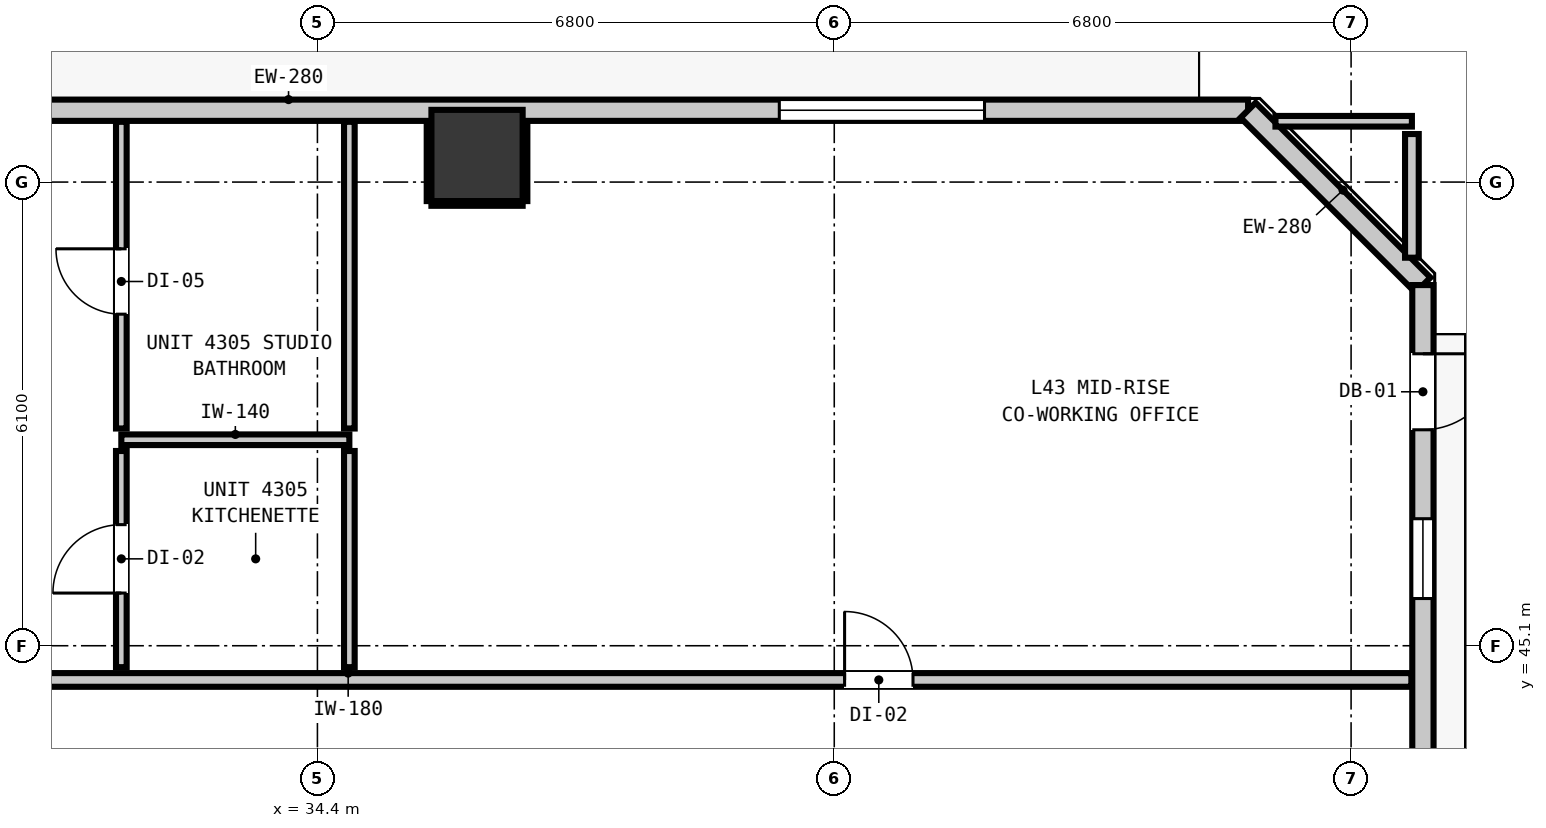
"""IFC4 building model, lengths in metres.
Left out: names, types, materials, properties, quantities, classifications, styles, units other than length and angle.
Written with IfcOpenShell. Run it as: python <this file> out.ifc"""

import sys

from ifc_helpers import new_model, si_unit, direction, frame, frame_2d, origin, origin_2d, place, context, subcontext, project, spatial, rectangle, extrude, element, fill, save


model = new_model("IFC4")
c1 = context("Model", 3, precision=1e-05, world=origin(), true_north=direction((0.0, 1.0)))
c2 = subcontext(c1, "Body", "Model", "MODEL_VIEW")
j1 = project(units=[si_unit("LENGTHUNIT", "METRE"), si_unit("PLANEANGLEUNIT", "RADIAN")], contexts=[c1])
p1 = place(None, origin())
s1 = spatial("IfcSite", under=j1, at=p1, CompositionType="ELEMENT")
p2 = place(p1, origin())
s2 = spatial("IfcBuilding", under=s1, at=p2, CompositionType="ELEMENT")
p3 = place(p2, frame((0.0, 0.0, 149.24)))
s3 = spatial("IfcBuildingStorey", under=s2, at=p3, CompositionType="ELEMENT", Elevation=149.24)
p4 = place(p3, frame((36.5, 51.55, 0.0), z_axis=(0.0, 0.0, 1.0), x_axis=(1.0, 0.0, 0.0)))
e1 = element("IfcColumn", 1, at=p4, inside=s3, PredefinedType="COLUMN", context=c2, shape_type="SweptSolid", body=[
    extrude(rectangle(XDim=1.2, YDim=1.2, at=origin_2d()), origin(), (0.0, 0.0, 1.0), 3.32),
])
p5 = place(p3, frame((11.555, 52.145, 0.0), z_axis=(0.0, 0.0, 1.0), x_axis=(1.0, 0.0, 0.0)))
e2 = element("IfcWall", 2, at=p5, inside=s3, PredefinedType="STANDARD", context=c2, shape_type="SweptSolid", body=[
    extrude(rectangle(XDim=35.09, YDim=0.28, at=frame_2d((17.545, 0.0))), origin(), (0.0, 0.0, 1.0), 3.08),
])
p6 = place(p5, frame((4.062, 0.0, 0.0)))
e3 = element("IfcOpeningElement", 3, at=p6, cuts=e2, PredefinedType="OPENING", context=c2, shape_type="SweptSolid", body=[
    extrude(rectangle(XDim=1.0, YDim=2.15, at=frame_2d((0.5, 1.075))), frame((0.0, 0.15, 0.0), z_axis=(0.0, -1.0, 0.0), x_axis=(1.0, 0.0, 0.0)), (0.0, 0.0, 1.0), 0.3),
])
p7 = place(p5, frame((5.888, 0.0, 0.85)))
e4 = element("IfcOpeningElement", 4, at=p7, cuts=e2, PredefinedType="OPENING", context=c2, shape_type="SweptSolid", body=[
    extrude(rectangle(XDim=1.05, YDim=1.65, at=frame_2d((0.525, 0.825))), frame((0.0, 0.15, 0.0), z_axis=(0.0, -1.0, 0.0), x_axis=(1.0, 0.0, 0.0)), (0.0, 0.0, 1.0), 0.3),
])
p8 = place(p5, frame((0.378, 0.0, 0.85)))
e5 = element("IfcOpeningElement", 5, at=p8, cuts=e2, PredefinedType="OPENING", context=c2, shape_type="SweptSolid", body=[
    extrude(rectangle(XDim=0.58, YDim=1.5, at=frame_2d((0.29, 0.75))), frame((0.0, 0.15, 0.0), z_axis=(0.0, -1.0, 0.0), x_axis=(1.0, 0.0, 0.0)), (0.0, 0.0, 1.0), 0.3),
])
p9 = place(p5, frame((10.433, 0.0, 0.85)))
e6 = element("IfcOpeningElement", 6, at=p9, cuts=e2, PredefinedType="OPENING", context=c2, shape_type="SweptSolid", body=[
    extrude(rectangle(XDim=1.05, YDim=1.65, at=frame_2d((0.525, 0.825))), frame((0.0, 0.15, 0.0), z_axis=(0.0, -1.0, 0.0), x_axis=(1.0, 0.0, 0.0)), (0.0, 0.0, 1.0), 0.3),
])
p10 = place(p5, frame((13.308, 0.0, 0.85)))
e7 = element("IfcOpeningElement", 7, at=p10, cuts=e2, PredefinedType="OPENING", context=c2, shape_type="SweptSolid", body=[
    extrude(rectangle(XDim=2.7, YDim=2.0, at=frame_2d((1.35, 1.0))), frame((0.0, 0.15, 0.0), z_axis=(0.0, -1.0, 0.0), x_axis=(1.0, 0.0, 0.0)), (0.0, 0.0, 1.0), 0.3),
])
p11 = place(p5, frame((28.922, 0.0, 0.85)))
e8 = element("IfcOpeningElement", 8, at=p11, cuts=e2, PredefinedType="OPENING", context=c2, shape_type="SweptSolid", body=[
    extrude(rectangle(XDim=2.7, YDim=2.0, at=frame_2d((1.35, 1.0))), frame((0.0, 0.15, 0.0), z_axis=(0.0, -1.0, 0.0), x_axis=(1.0, 0.0, 0.0)), (0.0, 0.0, 1.0), 0.3),
])
p12 = place(p3, frame((46.645, 52.145, 0.0), z_axis=(0.0, 0.0, 1.0), x_axis=(0.707106781187, -0.707106781187, 0.0)))
e9 = element("IfcWall", 9, at=p12, inside=s3, PredefinedType="STANDARD", context=c2, shape_type="SweptSolid", body=[
    extrude(rectangle(XDim=3.253, YDim=0.28, at=frame_2d((1.626, 0.0))), origin(), (0.0, 0.0, 1.0), 3.08),
])
p13 = place(p3, frame((48.945, 49.845, 0.0), z_axis=(0.0, 0.0, 1.0), x_axis=(0.0, -1.0, 0.0)))
e10 = element("IfcWall", 10, at=p13, inside=s3, PredefinedType="STANDARD", context=c2, shape_type="SweptSolid", body=[
    extrude(rectangle(XDim=32.29, YDim=0.28, at=frame_2d((16.145, 0.0))), origin(), (0.0, 0.0, 1.0), 3.08),
])
p14 = place(p13, frame((0.904, 0.0, 0.0)))
e11 = element("IfcOpeningElement", 11, at=p14, cuts=e10, PredefinedType="OPENING", context=c2, shape_type="SweptSolid", body=[
    extrude(rectangle(XDim=1.0, YDim=2.15, at=frame_2d((0.5, 1.075))), frame((0.0, 0.15, 0.0), z_axis=(0.0, -1.0, 0.0), x_axis=(1.0, 0.0, 0.0)), (0.0, 0.0, 1.0), 0.3),
])
p15 = place(p13, frame((3.074, 0.0, 0.85)))
e12 = element("IfcOpeningElement", 12, at=p15, cuts=e10, PredefinedType="OPENING", context=c2, shape_type="SweptSolid", body=[
    extrude(rectangle(XDim=1.05, YDim=1.65, at=frame_2d((0.525, 0.825))), frame((0.0, 0.15, 0.0), z_axis=(0.0, -1.0, 0.0), x_axis=(1.0, 0.0, 0.0)), (0.0, 0.0, 1.0), 0.3),
])
p16 = place(p13, frame((23.057, 0.0, 0.85)))
e13 = element("IfcOpeningElement", 13, at=p16, cuts=e10, PredefinedType="OPENING", context=c2, shape_type="SweptSolid", body=[
    extrude(rectangle(XDim=2.7, YDim=2.0, at=frame_2d((1.35, 1.0))), frame((0.0, 0.15, 0.0), z_axis=(0.0, -1.0, 0.0), x_axis=(1.0, 0.0, 0.0)), (0.0, 0.0, 1.0), 0.3),
])
p17 = place(p13, frame((20.733, 0.0, 0.85)))
e14 = element("IfcOpeningElement", 14, at=p17, cuts=e10, PredefinedType="OPENING", context=c2, shape_type="SweptSolid", body=[
    extrude(rectangle(XDim=1.05, YDim=1.65, at=frame_2d((0.525, 0.825))), frame((0.0, 0.15, 0.0), z_axis=(0.0, -1.0, 0.0), x_axis=(1.0, 0.0, 0.0)), (0.0, 0.0, 1.0), 0.3),
])
p18 = place(p13, frame((13.523, 0.0, 0.85)))
e15 = element("IfcOpeningElement", 15, at=p18, cuts=e10, PredefinedType="OPENING", context=c2, shape_type="SweptSolid", body=[
    extrude(rectangle(XDim=2.7, YDim=2.0, at=frame_2d((1.35, 1.0))), frame((0.0, 0.15, 0.0), z_axis=(0.0, -1.0, 0.0), x_axis=(1.0, 0.0, 0.0)), (0.0, 0.0, 1.0), 0.3),
])
p19 = place(p13, frame((11.247, 0.0, 0.85)))
e16 = element("IfcOpeningElement", 16, at=p19, cuts=e10, PredefinedType="OPENING", context=c2, shape_type="SweptSolid", body=[
    extrude(rectangle(XDim=1.05, YDim=1.65, at=frame_2d((0.525, 0.825))), frame((0.0, 0.15, 0.0), z_axis=(0.0, -1.0, 0.0), x_axis=(1.0, 0.0, 0.0)), (0.0, 0.0, 1.0), 0.3),
])
p20 = place(p3, frame((9.407, 44.65, 0.0), z_axis=(0.0, 0.0, 1.0), x_axis=(1.0, 0.0, 0.0)))
e17 = element("IfcWall", 17, at=p20, inside=s3, PredefinedType="PARTITIONING", context=c2, shape_type="SweptSolid", body=[
    extrude(rectangle(XDim=39.386, YDim=0.18, at=frame_2d((19.693, 0.0))), origin(), (0.0, 0.0, 1.0), 3.08),
])
p21 = place(p20, frame((7.193, 0.0, 0.0)))
e18 = element("IfcOpeningElement", 18, at=p21, cuts=e17, PredefinedType="OPENING", context=c2, shape_type="SweptSolid", body=[
    extrude(rectangle(XDim=1.0, YDim=2.15, at=frame_2d((0.5, 1.075))), frame((0.0, 0.1, 0.0), z_axis=(0.0, -1.0, 0.0), x_axis=(1.0, 0.0, 0.0)), (0.0, 0.0, 1.0), 0.2),
])
p22 = place(p20, frame((17.866, 0.0, 0.0)))
e19 = element("IfcOpeningElement", 19, at=p22, cuts=e17, PredefinedType="OPENING", context=c2, shape_type="SweptSolid", body=[
    extrude(rectangle(XDim=1.0, YDim=2.15, at=frame_2d((0.5, 1.075))), frame((0.0, 0.1, 0.0), z_axis=(0.0, -1.0, 0.0), x_axis=(1.0, 0.0, 0.0)), (0.0, 0.0, 1.0), 0.2),
])
p23 = place(p20, frame((31.929, 0.0, 0.0)))
e20 = element("IfcOpeningElement", 20, at=p23, cuts=e17, PredefinedType="OPENING", context=c2, shape_type="SweptSolid", body=[
    extrude(rectangle(XDim=0.9, YDim=2.1, at=frame_2d((0.45, 1.05))), frame((0.0, 0.1, 0.0), z_axis=(0.0, -1.0, 0.0), x_axis=(1.0, 0.0, 0.0)), (0.0, 0.0, 1.0), 0.2),
])
p24 = place(p3, frame((31.82, 47.81, 0.0), z_axis=(0.0, 0.0, 1.0), x_axis=(1.0, 0.0, 0.0)))
e21 = element("IfcWall", 21, at=p24, inside=s3, PredefinedType="PARTITIONING", context=c2, shape_type="SweptSolid", body=[
    extrude(rectangle(XDim=3.0, YDim=0.14, at=frame_2d((1.5, 0.0))), origin(), (0.0, 0.0, 1.0), 3.08),
])
p25 = place(p3, frame((47.005, 52.0, 0.0), z_axis=(0.0, 0.0, 1.0), x_axis=(1.0, 0.0, 0.0)))
e22 = element("IfcWall", 22, at=p25, inside=s3, PredefinedType="PARTITIONING", context=c2, shape_type="SweptSolid", body=[
    extrude(rectangle(XDim=1.795, YDim=0.14, at=frame_2d((0.897, 0.0))), origin(), (0.0, 0.0, 1.0), 3.08),
])
p26 = place(p3, frame((48.8, 50.205, 0.0), z_axis=(0.0, 0.0, 1.0), x_axis=(0.0, 1.0, 0.0)))
e23 = element("IfcWall", 23, at=p26, inside=s3, PredefinedType="PARTITIONING", context=c2, shape_type="SweptSolid", body=[
    extrude(rectangle(XDim=1.627, YDim=0.18, at=frame_2d((0.813, 0.0))), origin(), (0.0, 0.0, 1.0), 3.08),
])
p27 = place(p3, frame((31.82, 44.818, 0.0), z_axis=(0.0, 0.0, 1.0), x_axis=(0.0, 1.0, 0.0)))
e24 = element("IfcWall", 24, at=p27, inside=s3, PredefinedType="PARTITIONING", context=c2, shape_type="SweptSolid", body=[
    extrude(rectangle(XDim=2.844, YDim=0.14, at=frame_2d((1.422, 0.0))), origin(), (0.0, 0.0, 1.0), 3.08),
])
p28 = place(p27, frame((0.975, 0.0, 0.0)))
e25 = element("IfcOpeningElement", 25, at=p28, cuts=e24, PredefinedType="OPENING", context=c2, shape_type="SweptSolid", body=[
    extrude(rectangle(XDim=0.9, YDim=2.1, at=frame_2d((0.45, 1.05))), frame((0.0, 0.08, 0.0), z_axis=(0.0, -1.0, 0.0), x_axis=(1.0, 0.0, 0.0)), (0.0, 0.0, 1.0), 0.16),
])
p29 = place(p3, frame((31.82, 47.958, 0.0), z_axis=(0.0, 0.0, 1.0), x_axis=(0.0, 1.0, 0.0)))
e26 = element("IfcWall", 26, at=p29, inside=s3, PredefinedType="PARTITIONING", context=c2, shape_type="SweptSolid", body=[
    extrude(rectangle(XDim=4.035, YDim=0.14, at=frame_2d((2.018, 0.0))), origin(), (0.0, 0.0, 1.0), 3.08),
])
p30 = place(p29, frame((1.504, 0.0, 0.0)))
e27 = element("IfcOpeningElement", 27, at=p30, cuts=e26, PredefinedType="OPENING", context=c2, shape_type="SweptSolid", body=[
    extrude(rectangle(XDim=0.86, YDim=2.02, at=frame_2d((0.43, 1.01))), frame((0.0, 0.08, 0.0), z_axis=(0.0, -1.0, 0.0), x_axis=(1.0, 0.0, 0.0)), (0.0, 0.0, 1.0), 0.16),
])
p31 = place(p3, frame((34.82, 44.818, 0.0), z_axis=(0.0, 0.0, 1.0), x_axis=(0.0, 1.0, 0.0)))
e28 = element("IfcWall", 28, at=p31, inside=s3, PredefinedType="PARTITIONING", context=c2, shape_type="SweptSolid", body=[
    extrude(rectangle(XDim=2.844, YDim=0.14, at=frame_2d((1.422, 0.0))), origin(), (0.0, 0.0, 1.0), 3.08),
])
p32 = place(p3, frame((34.82, 47.958, 0.0), z_axis=(0.0, 0.0, 1.0), x_axis=(0.0, 1.0, 0.0)))
e29 = element("IfcWall", 29, at=p32, inside=s3, PredefinedType="PARTITIONING", context=c2, shape_type="SweptSolid", body=[
    extrude(rectangle(XDim=4.035, YDim=0.14, at=frame_2d((2.018, 0.0))), origin(), (0.0, 0.0, 1.0), 3.08),
])
p33 = place(p3, frame((35.9, 50.918, 0.0), z_axis=(0.0, 0.0, 1.0), x_axis=(1.0, 0.0, 0.0)))
e30 = element("IfcWall", 30, at=p33, inside=s3, PredefinedType="PARTITIONING", context=c2, shape_type="SweptSolid", body=[
    extrude(rectangle(XDim=1.2, YDim=0.06, at=frame_2d((0.6, 0.0))), origin(), (0.0, 0.0, 1.0), 1.45),
])
for number, where, z_axis, x_axis in (
    (31, (35.868, 50.95, 0.0), (0.0, 0.0, 1.0), (0.0, 1.0, 0.0)),
    (32, (37.132, 50.95, 0.0), (0.0, 0.0, 1.0), (0.0, 1.0, 0.0)),
):
    element("IfcWall", number, at=place(p3, frame(where, z_axis=z_axis, x_axis=x_axis)), inside=s3, PredefinedType="PARTITIONING", context=c2, shape_type="SweptSolid", body=[
        extrude(rectangle(XDim=1.04, YDim=0.06, at=frame_2d((0.52, 0.0))), origin(), (0.0, 0.0, 1.0), 1.45),
    ])
p34 = place(p14, origin())
e33 = element("IfcDoor", 33, at=p34, inside=s3, OperationType="SINGLE_SWING_LEFT", PredefinedType="DOOR", context=c2, shape_type="SweptSolid", body=[
    extrude(rectangle(XDim=1.0, YDim=2.15, at=frame_2d((0.5, 1.075))), frame((0.0, 0.025, 0.0), z_axis=(0.0, -1.0, 0.0), x_axis=(1.0, 0.0, 0.0)), (0.0, 0.0, 1.0), 0.05),
])
fill(e11, e33)
p35 = place(p11, origin())
e34 = element("IfcWindow", 34, at=p35, inside=s3, PartitioningType="SINGLE_PANEL", PredefinedType="WINDOW", context=c2, shape_type="SweptSolid", body=[
    extrude(rectangle(XDim=2.7, YDim=2.0, at=frame_2d((1.35, 1.0))), frame((0.0, 0.03, 0.0), z_axis=(0.0, -1.0, 0.0), x_axis=(1.0, 0.0, 0.0)), (0.0, 0.0, 1.0), 0.06),
])
fill(e8, e34)
p36 = place(p15, origin())
e35 = element("IfcWindow", 35, at=p36, inside=s3, PartitioningType="SINGLE_PANEL", PredefinedType="WINDOW", context=c2, shape_type="SweptSolid", body=[
    extrude(rectangle(XDim=1.05, YDim=1.65, at=frame_2d((0.525, 0.825))), frame((0.0, 0.03, 0.0), z_axis=(0.0, -1.0, 0.0), x_axis=(1.0, 0.0, 0.0)), (0.0, 0.0, 1.0), 0.06),
])
fill(e12, e35)
p37 = place(p28, origin())
e36 = element("IfcDoor", 36, at=p37, inside=s3, OperationType="SINGLE_SWING_LEFT", PredefinedType="DOOR", context=c2, shape_type="SweptSolid", body=[
    extrude(rectangle(XDim=0.9, YDim=2.1, at=frame_2d((0.45, 1.05))), frame((0.0, 0.025, 0.0), z_axis=(0.0, -1.0, 0.0), x_axis=(1.0, 0.0, 0.0)), (0.0, 0.0, 1.0), 0.05),
])
fill(e25, e36)
p38 = place(p30, origin())
e37 = element("IfcDoor", 37, at=p38, inside=s3, OperationType="SINGLE_SWING_RIGHT", PredefinedType="DOOR", context=c2, shape_type="SweptSolid", body=[
    extrude(rectangle(XDim=0.86, YDim=2.02, at=frame_2d((0.43, 1.01))), frame((0.0, 0.025, 0.0), z_axis=(0.0, -1.0, 0.0), x_axis=(1.0, 0.0, 0.0)), (0.0, 0.0, 1.0), 0.05),
])
fill(e27, e37)
p39 = place(p23, origin())
e38 = element("IfcDoor", 38, at=p39, inside=s3, OperationType="SINGLE_SWING_LEFT", PredefinedType="DOOR", context=c2, shape_type="SweptSolid", body=[
    extrude(rectangle(XDim=0.9, YDim=2.1, at=frame_2d((0.45, 1.05))), frame((0.0, 0.025, 0.0), z_axis=(0.0, -1.0, 0.0), x_axis=(1.0, 0.0, 0.0)), (0.0, 0.0, 1.0), 0.05),
])
fill(e20, e38)
save(model, sys.argv[1])
